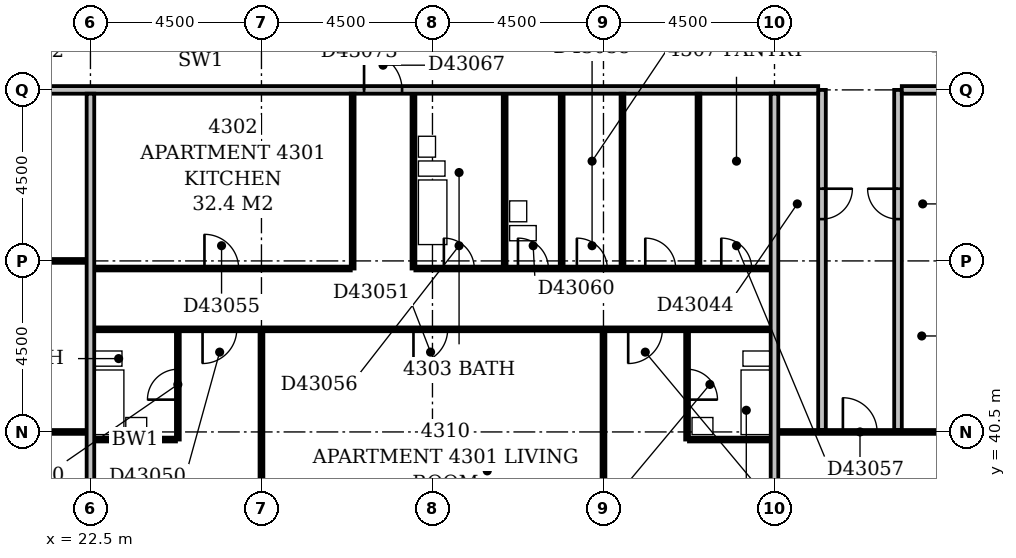
"""IFC4 building model, lengths in metres.
Left out: names, types, materials, properties, quantities, classifications, styles, units other than length and angle.
Written with IfcOpenShell. Run it as: python <this file> out.ifc"""

import sys

from ifc_helpers import new_model, si_unit, direction, frame, frame_2d, origin, place, context, subcontext, project, spatial, rectangle, extrude, element, fill, save


model = new_model("IFC4")
c1 = context("Model", 3, precision=1e-05, world=origin(), true_north=direction((0.0, 1.0)))
c2 = subcontext(c1, "Body", "Model", "MODEL_VIEW")
j1 = project(units=[si_unit("LENGTHUNIT", "METRE"), si_unit("PLANEANGLEUNIT", "RADIAN")], contexts=[c1])
p1 = place(None, origin())
s1 = spatial("IfcSite", under=j1, at=p1, CompositionType="ELEMENT")
p2 = place(p1, origin())
s2 = spatial("IfcBuilding", under=s1, at=p2, CompositionType="ELEMENT")
p3 = place(p2, frame((0.0, 0.0, 170.0)))
s3 = spatial("IfcBuildingStorey", under=s2, at=p3, CompositionType="ELEMENT", Elevation=170.0)
p4 = place(p3, frame((22.5, 36.5, 0.0), z_axis=(0.0, 0.0, 1.0), x_axis=(0.0, 1.0, 0.0)))
e1 = element("IfcWall", 1, at=p4, inside=s3, PredefinedType="PARTITIONING", context=c2, shape_type="SweptSolid", body=[
    extrude(rectangle(XDim=12.9, YDim=0.2, at=frame_2d((6.45, 0.0))), origin(), (0.0, 0.0, 1.0), 3.15),
])
p5 = place(p3, frame((27.0, 36.5, 0.0), z_axis=(0.0, 0.0, 1.0), x_axis=(0.0, 1.0, 0.0)))
e2 = element("IfcWall", 2, at=p5, inside=s3, PredefinedType="PARTITIONING", context=c2, shape_type="SweptSolid", body=[
    extrude(rectangle(XDim=6.65, YDim=0.1, at=frame_2d((3.325, 0.0))), origin(), (0.0, 0.0, 1.0), 2.45),
])
p6 = place(p3, frame((36.0, 36.5, 0.0), z_axis=(0.0, 0.0, 1.0), x_axis=(0.0, 1.0, 0.0)))
e3 = element("IfcWall", 3, at=p6, inside=s3, PredefinedType="PARTITIONING", context=c2, shape_type="SweptSolid", body=[
    extrude(rectangle(XDim=6.65, YDim=0.1, at=frame_2d((3.325, 0.0))), origin(), (0.0, 0.0, 1.0), 2.25),
])
p7 = place(p3, frame((40.5, 36.5, 0.0), z_axis=(0.0, 0.0, 1.0), x_axis=(0.0, 1.0, 0.0)))
e4 = element("IfcWall", 4, at=p7, inside=s3, PredefinedType="PARTITIONING", context=c2, shape_type="SweptSolid", body=[
    extrude(rectangle(XDim=12.9, YDim=0.2, at=frame_2d((6.45, 0.0))), origin(), (0.0, 0.0, 1.0), 3.15),
])
p8 = place(p3, frame((22.6, 40.3, 0.0), z_axis=(0.0, 0.0, 1.0), x_axis=(1.0, 0.0, 0.0)))
e5 = element("IfcWall", 5, at=p8, inside=s3, PredefinedType="PLUMBINGWALL", context=c2, shape_type="SweptSolid", body=[
    extrude(rectangle(XDim=2.15, YDim=0.1, at=frame_2d((1.075, 0.0))), origin(), (0.0, 0.0, 1.0), 3.15),
])
p9 = place(p3, frame((24.8, 40.3, 0.0), z_axis=(0.0, 0.0, 1.0), x_axis=(0.0, 1.0, 0.0)))
e6 = element("IfcWall", 6, at=p9, inside=s3, PredefinedType="PLUMBINGWALL", context=c2, shape_type="SweptSolid", body=[
    extrude(rectangle(XDim=2.85, YDim=0.1, at=frame_2d((1.425, 0.0))), origin(), (0.0, 0.0, 1.0), 3.15),
])
p10 = place(p9, frame((1.05, 0.0, 0.0)))
e7 = element("IfcOpeningElement", 7, at=p10, cuts=e6, PredefinedType="OPENING", context=c2, shape_type="SweptSolid", body=[
    extrude(rectangle(XDim=0.8, YDim=2.1, at=frame_2d((0.4, 1.05))), frame((0.0, 0.062, 0.0), z_axis=(0.0, -1.0, 0.0), x_axis=(1.0, 0.0, 0.0)), (0.0, 0.0, 1.0), 0.124),
])
p11 = place(p3, frame((38.2, 40.3, 0.0), z_axis=(0.0, 0.0, 1.0), x_axis=(0.0, 1.0, 0.0)))
e8 = element("IfcWall", 8, at=p11, inside=s3, PredefinedType="PLUMBINGWALL", context=c2, shape_type="SweptSolid", body=[
    extrude(rectangle(XDim=2.85, YDim=0.1, at=frame_2d((1.425, 0.0))), origin(), (0.0, 0.0, 1.0), 3.15),
])
p12 = place(p11, frame((1.05, 0.0, 0.0)))
e9 = element("IfcOpeningElement", 9, at=p12, cuts=e8, PredefinedType="OPENING", context=c2, shape_type="SweptSolid", body=[
    extrude(rectangle(XDim=0.8, YDim=2.1, at=frame_2d((0.4, 1.05))), frame((0.0, 0.062, 0.0), z_axis=(0.0, -1.0, 0.0), x_axis=(1.0, 0.0, 0.0)), (0.0, 0.0, 1.0), 0.124),
])
p13 = place(p3, frame((38.25, 40.3, 0.0), z_axis=(0.0, 0.0, 1.0), x_axis=(1.0, 0.0, 0.0)))
e10 = element("IfcWall", 10, at=p13, inside=s3, PredefinedType="PLUMBINGWALL", context=c2, shape_type="SweptSolid", body=[
    extrude(rectangle(XDim=2.15, YDim=0.1, at=frame_2d((1.075, 0.0))), origin(), (0.0, 0.0, 1.0), 3.15),
])
p14 = place(p3, frame((9.1, 40.5, 0.0), z_axis=(0.0, 0.0, 1.0), x_axis=(1.0, 0.0, 0.0)))
e11 = element("IfcWall", 11, at=p14, inside=s3, PredefinedType="PARTITIONING", context=c2, shape_type="SweptSolid", body=[
    extrude(rectangle(XDim=13.3, YDim=0.1, at=frame_2d((6.65, 0.0))), origin(), (0.0, 0.0, 1.0), 3.15),
])
p15 = place(p3, frame((40.6, 40.5, 0.0), z_axis=(0.0, 0.0, 1.0), x_axis=(1.0, 0.0, 0.0)))
e12 = element("IfcWall", 12, at=p15, inside=s3, PredefinedType="PARTITIONING", context=c2, shape_type="SweptSolid", body=[
    extrude(rectangle(XDim=4.3, YDim=0.1, at=frame_2d((2.15, 0.0))), origin(), (0.0, 0.0, 1.0), 3.15),
])
p16 = place(p15, frame((1.7, 0.0, 0.0)))
e13 = element("IfcOpeningElement", 13, at=p16, cuts=e12, PredefinedType="OPENING", context=c2, shape_type="SweptSolid", body=[
    extrude(rectangle(XDim=0.9, YDim=2.1, at=frame_2d((0.45, 1.05))), frame((0.0, 0.062, 0.0), z_axis=(0.0, -1.0, 0.0), x_axis=(1.0, 0.0, 0.0)), (0.0, 0.0, 1.0), 0.124),
])
p17 = place(p3, frame((41.75, 40.55, 0.0), z_axis=(0.0, 0.0, 1.0), x_axis=(0.0, 1.0, 0.0)))
e14 = element("IfcWall", 14, at=p17, inside=s3, PredefinedType="PARTITIONING", context=c2, shape_type="SweptSolid", body=[
    extrude(rectangle(XDim=8.95, YDim=0.2, at=frame_2d((4.475, 0.0))), origin(), (0.0, 0.0, 1.0), 3.15),
])
p18 = place(p17, frame((5.55, 0.0, 0.0)))
e15 = element("IfcOpeningElement", 15, at=p18, cuts=e14, PredefinedType="OPENING", context=c2, shape_type="SweptSolid", body=[
    extrude(rectangle(XDim=0.8, YDim=2.1, at=frame_2d((0.4, 1.05))), frame((0.0, 0.112, 0.0), z_axis=(0.0, -1.0, 0.0), x_axis=(1.0, 0.0, 0.0)), (0.0, 0.0, 1.0), 0.224),
])
p19 = place(p3, frame((43.75, 40.55, 0.0), z_axis=(0.0, 0.0, 1.0), x_axis=(0.0, 1.0, 0.0)))
e16 = element("IfcWall", 16, at=p19, inside=s3, PredefinedType="PARTITIONING", context=c2, shape_type="SweptSolid", body=[
    extrude(rectangle(XDim=8.95, YDim=0.2, at=frame_2d((4.475, 0.0))), origin(), (0.0, 0.0, 1.0), 3.15),
])
p20 = place(p19, frame((5.55, 0.0, 0.0)))
e17 = element("IfcOpeningElement", 17, at=p20, cuts=e16, PredefinedType="OPENING", context=c2, shape_type="SweptSolid", body=[
    extrude(rectangle(XDim=0.8, YDim=2.1, at=frame_2d((0.4, 1.05))), frame((0.0, 0.112, 0.0), z_axis=(0.0, -1.0, 0.0), x_axis=(1.0, 0.0, 0.0)), (0.0, 0.0, 1.0), 0.224),
])
p21 = place(p3, frame((22.6, 43.2, 0.0), z_axis=(0.0, 0.0, 1.0), x_axis=(1.0, 0.0, 0.0)))
e18 = element("IfcWall", 18, at=p21, inside=s3, PredefinedType="PARTITIONING", context=c2, shape_type="SweptSolid", body=[
    extrude(rectangle(XDim=17.8, YDim=0.1, at=frame_2d((8.9, 0.0))), origin(), (0.0, 0.0, 1.0), 3.15),
])
p22 = place(p21, frame((2.85, 0.0, 0.0)))
e19 = element("IfcOpeningElement", 19, at=p22, cuts=e18, PredefinedType="OPENING", context=c2, shape_type="SweptSolid", body=[
    extrude(rectangle(XDim=0.9, YDim=2.1, at=frame_2d((0.45, 1.05))), frame((0.0, 0.062, 0.0), z_axis=(0.0, -1.0, 0.0), x_axis=(1.0, 0.0, 0.0)), (0.0, 0.0, 1.0), 0.124),
])
p23 = place(p21, frame((8.4, 0.0, 0.0)))
e20 = element("IfcOpeningElement", 20, at=p23, cuts=e18, PredefinedType="OPENING", context=c2, shape_type="SweptSolid", body=[
    extrude(rectangle(XDim=0.9, YDim=2.1, at=frame_2d((0.45, 1.05))), frame((0.0, 0.062, 0.0), z_axis=(0.0, -1.0, 0.0), x_axis=(1.0, 0.0, 0.0)), (0.0, 0.0, 1.0), 0.124),
])
p24 = place(p21, frame((14.05, 0.0, 0.0)))
e21 = element("IfcOpeningElement", 21, at=p24, cuts=e18, PredefinedType="OPENING", context=c2, shape_type="SweptSolid", body=[
    extrude(rectangle(XDim=0.9, YDim=2.1, at=frame_2d((0.45, 1.05))), frame((0.0, 0.062, 0.0), z_axis=(0.0, -1.0, 0.0), x_axis=(1.0, 0.0, 0.0)), (0.0, 0.0, 1.0), 0.124),
])
p25 = place(p3, frame((22.6, 44.8, 0.0), z_axis=(0.0, 0.0, 1.0), x_axis=(1.0, 0.0, 0.0)))
e22 = element("IfcWall", 22, at=p25, inside=s3, PredefinedType="PARTITIONING", context=c2, shape_type="SweptSolid", body=[
    extrude(rectangle(XDim=6.75, YDim=0.1, at=frame_2d((3.375, 0.0))), origin(), (0.0, 0.0, 1.0), 3.15),
])
p26 = place(p25, frame((2.9, 0.0, 0.0)))
e23 = element("IfcOpeningElement", 23, at=p26, cuts=e22, PredefinedType="OPENING", context=c2, shape_type="SweptSolid", body=[
    extrude(rectangle(XDim=0.9, YDim=2.1, at=frame_2d((0.45, 1.05))), frame((0.0, 0.062, 0.0), z_axis=(0.0, -1.0, 0.0), x_axis=(1.0, 0.0, 0.0)), (0.0, 0.0, 1.0), 0.124),
])
p27 = place(p3, frame((29.4, 44.8, 0.0), z_axis=(0.0, 0.0, 1.0), x_axis=(0.0, 1.0, 0.0)))
e24 = element("IfcWall", 24, at=p27, inside=s3, PredefinedType="PARTITIONING", context=c2, shape_type="SweptSolid", body=[
    extrude(rectangle(XDim=4.6, YDim=0.1, at=frame_2d((2.3, 0.0))), origin(), (0.0, 0.0, 1.0), 3.15),
])
p28 = place(p3, frame((31.0, 44.8, 0.0), z_axis=(0.0, 0.0, 1.0), x_axis=(0.0, 1.0, 0.0)))
e25 = element("IfcWall", 25, at=p28, inside=s3, PredefinedType="PLUMBINGWALL", context=c2, shape_type="SweptSolid", body=[
    extrude(rectangle(XDim=4.6, YDim=0.1, at=frame_2d((2.3, 0.0))), origin(), (0.0, 0.0, 1.0), 3.15),
])
p29 = place(p3, frame((31.05, 44.8, 0.0), z_axis=(0.0, 0.0, 1.0), x_axis=(1.0, 0.0, 0.0)))
e26 = element("IfcWall", 26, at=p29, inside=s3, PredefinedType="PARTITIONING", context=c2, shape_type="SweptSolid", body=[
    extrude(rectangle(XDim=9.35, YDim=0.1, at=frame_2d((4.675, 0.0))), origin(), (0.0, 0.0, 1.0), 3.15),
])
p30 = place(p29, frame((0.75, 0.0, 0.0)))
e27 = element("IfcOpeningElement", 27, at=p30, cuts=e26, PredefinedType="OPENING", context=c2, shape_type="SweptSolid", body=[
    extrude(rectangle(XDim=0.8, YDim=2.1, at=frame_2d((0.4, 1.05))), frame((0.0, 0.062, 0.0), z_axis=(0.0, -1.0, 0.0), x_axis=(1.0, 0.0, 0.0)), (0.0, 0.0, 1.0), 0.124),
])
p31 = place(p29, frame((8.05, 0.0, 0.0)))
e28 = element("IfcOpeningElement", 28, at=p31, cuts=e26, PredefinedType="OPENING", context=c2, shape_type="SweptSolid", body=[
    extrude(rectangle(XDim=0.8, YDim=2.1, at=frame_2d((0.4, 1.05))), frame((0.0, 0.062, 0.0), z_axis=(0.0, -1.0, 0.0), x_axis=(1.0, 0.0, 0.0)), (0.0, 0.0, 1.0), 0.124),
])
p32 = place(p29, frame((4.25, 0.0, 0.0)))
e29 = element("IfcOpeningElement", 29, at=p32, cuts=e26, PredefinedType="OPENING", context=c2, shape_type="SweptSolid", body=[
    extrude(rectangle(XDim=0.8, YDim=2.1, at=frame_2d((0.4, 1.05))), frame((0.0, 0.062, 0.0), z_axis=(0.0, -1.0, 0.0), x_axis=(1.0, 0.0, 0.0)), (0.0, 0.0, 1.0), 0.124),
])
p33 = place(p29, frame((6.05, 0.0, 0.0)))
e30 = element("IfcOpeningElement", 30, at=p33, cuts=e26, PredefinedType="OPENING", context=c2, shape_type="SweptSolid", body=[
    extrude(rectangle(XDim=0.8, YDim=2.1, at=frame_2d((0.4, 1.05))), frame((0.0, 0.062, 0.0), z_axis=(0.0, -1.0, 0.0), x_axis=(1.0, 0.0, 0.0)), (0.0, 0.0, 1.0), 0.124),
])
p34 = place(p29, frame((2.7, 0.0, 0.0)))
e31 = element("IfcOpeningElement", 31, at=p34, cuts=e26, PredefinedType="OPENING", context=c2, shape_type="SweptSolid", body=[
    extrude(rectangle(XDim=0.8, YDim=2.1, at=frame_2d((0.4, 1.05))), frame((0.0, 0.062, 0.0), z_axis=(0.0, -1.0, 0.0), x_axis=(1.0, 0.0, 0.0)), (0.0, 0.0, 1.0), 0.124),
])
for number, where, z_axis, x_axis in (
    (32, (33.4, 44.85, 0.0), (0.0, 0.0, 1.0), (0.0, 1.0, 0.0)),
    (33, (34.9, 44.85, 0.0), (0.0, 0.0, 1.0), (0.0, 1.0, 0.0)),
):
    element("IfcWall", number, at=place(p3, frame(where, z_axis=z_axis, x_axis=x_axis)), inside=s3, PredefinedType="PLUMBINGWALL", context=c2, shape_type="SweptSolid", body=[
        extrude(rectangle(XDim=4.55, YDim=0.1, at=frame_2d((2.275, 0.0))), origin(), (0.0, 0.0, 1.0), 3.15),
    ])
p35 = place(p3, frame((36.5, 44.85, 0.0), z_axis=(0.0, 0.0, 1.0), x_axis=(0.0, 1.0, 0.0)))
e34 = element("IfcWall", 34, at=p35, inside=s3, PredefinedType="PARTITIONING", context=c2, shape_type="SweptSolid", body=[
    extrude(rectangle(XDim=4.55, YDim=0.1, at=frame_2d((2.275, 0.0))), origin(), (0.0, 0.0, 1.0), 2.25),
])
p36 = place(p3, frame((38.5, 44.85, 0.0), z_axis=(0.0, 0.0, 1.0), x_axis=(0.0, 1.0, 0.0)))
e35 = element("IfcWall", 35, at=p36, inside=s3, PredefinedType="PARTITIONING", context=c2, shape_type="SweptSolid", body=[
    extrude(rectangle(XDim=4.55, YDim=0.1, at=frame_2d((2.275, 0.0))), origin(), (0.0, 0.0, 1.0), 3.15),
])
p37 = place(p3, frame((9.1, 45.0, 0.0), z_axis=(0.0, 0.0, 1.0), x_axis=(1.0, 0.0, 0.0)))
e36 = element("IfcWall", 36, at=p37, inside=s3, PredefinedType="PARTITIONING", context=c2, shape_type="SweptSolid", body=[
    extrude(rectangle(XDim=13.3, YDim=0.1, at=frame_2d((6.65, 0.0))), origin(), (0.0, 0.0, 1.0), 3.15),
])
p38 = place(p3, frame((9.1, 49.5, 0.0), z_axis=(0.0, 0.0, 1.0), x_axis=(1.0, 0.0, 0.0)))
e37 = element("IfcWall", 37, at=p38, inside=s3, PredefinedType="PARTITIONING", context=c2, shape_type="SweptSolid", body=[
    extrude(rectangle(XDim=32.55, YDim=0.2, at=frame_2d((16.275, 0.0))), origin(), (0.0, 0.0, 1.0), 3.15),
])
p39 = place(p38, frame((20.6, 0.0, 0.0)))
e38 = element("IfcOpeningElement", 38, at=p39, cuts=e37, PredefinedType="OPENING", context=c2, shape_type="SweptSolid", body=[
    extrude(rectangle(XDim=1.0, YDim=2.1, at=frame_2d((0.5, 1.05))), frame((0.0, 0.112, 0.0), z_axis=(0.0, -1.0, 0.0), x_axis=(1.0, 0.0, 0.0)), (0.0, 0.0, 1.0), 0.224),
])
p40 = place(p38, frame((6.15, 0.0, 0.0)))
e39 = element("IfcOpeningElement", 39, at=p40, cuts=e37, PredefinedType="OPENING", context=c2, shape_type="SweptSolid", body=[
    extrude(rectangle(XDim=0.9, YDim=2.1, at=frame_2d((0.45, 1.05))), frame((0.0, 0.112, 0.0), z_axis=(0.0, -1.0, 0.0), x_axis=(1.0, 0.0, 0.0)), (0.0, 0.0, 1.0), 0.224),
])
p41 = place(p3, frame((43.85, 49.5, 0.0), z_axis=(0.0, 0.0, 1.0), x_axis=(1.0, 0.0, 0.0)))
e40 = element("IfcWall", 40, at=p41, inside=s3, PredefinedType="PARTITIONING", context=c2, shape_type="SweptSolid", body=[
    extrude(rectangle(XDim=11.3, YDim=0.2, at=frame_2d((5.65, 0.0))), origin(), (0.0, 0.0, 1.0), 3.15),
])
p42 = place(p41, frame((1.45, 0.0, 0.0)))
e41 = element("IfcOpeningElement", 41, at=p42, cuts=e40, PredefinedType="OPENING", context=c2, shape_type="SweptSolid", body=[
    extrude(rectangle(XDim=1.0, YDim=2.1, at=frame_2d((0.5, 1.05))), frame((0.0, 0.112, 0.0), z_axis=(0.0, -1.0, 0.0), x_axis=(1.0, 0.0, 0.0)), (0.0, 0.0, 1.0), 0.224),
])
p43 = place(p10, origin())
e42 = element("IfcDoor", 42, at=p43, inside=s3, OperationType="SINGLE_SWING_LEFT", PredefinedType="DOOR", context=c2, shape_type="SweptSolid", body=[
    extrude(rectangle(XDim=0.8, YDim=2.1, at=frame_2d((0.4, 1.05))), frame((0.0, 0.025, 0.0), z_axis=(0.0, -1.0, 0.0), x_axis=(1.0, 0.0, 0.0)), (0.0, 0.0, 1.0), 0.05),
])
fill(e7, e42)
p44 = place(p12, frame((0.8, 0.0, 0.0), z_axis=(0.0, 0.0, 1.0), x_axis=(-1.0, 0.0, 0.0)))
e43 = element("IfcDoor", 43, at=p44, inside=s3, OperationType="SINGLE_SWING_RIGHT", PredefinedType="DOOR", context=c2, shape_type="SweptSolid", body=[
    extrude(rectangle(XDim=0.8, YDim=2.1, at=frame_2d((0.4, 1.05))), frame((0.0, 0.025, 0.0), z_axis=(0.0, -1.0, 0.0), x_axis=(1.0, 0.0, 0.0)), (0.0, 0.0, 1.0), 0.05),
])
fill(e9, e43)
p45 = place(p16, origin())
e44 = element("IfcDoor", 44, at=p45, inside=s3, OperationType="SINGLE_SWING_LEFT", PredefinedType="DOOR", context=c2, shape_type="SweptSolid", body=[
    extrude(rectangle(XDim=0.9, YDim=2.1, at=frame_2d((0.45, 1.05))), frame((0.0, 0.025, 0.0), z_axis=(0.0, -1.0, 0.0), x_axis=(1.0, 0.0, 0.0)), (0.0, 0.0, 1.0), 0.05),
])
fill(e13, e44)
p46 = place(p18, origin())
e45 = element("IfcDoor", 45, at=p46, inside=s3, OperationType="SINGLE_SWING_RIGHT", PredefinedType="DOOR", context=c2, shape_type="SweptSolid", body=[
    extrude(rectangle(XDim=0.8, YDim=2.1, at=frame_2d((0.4, 1.05))), frame((0.0, 0.025, 0.0), z_axis=(0.0, -1.0, 0.0), x_axis=(1.0, 0.0, 0.0)), (0.0, 0.0, 1.0), 0.05),
])
fill(e15, e45)
p47 = place(p20, frame((0.8, 0.0, 0.0), z_axis=(0.0, 0.0, 1.0), x_axis=(-1.0, 0.0, 0.0)))
e46 = element("IfcDoor", 46, at=p47, inside=s3, OperationType="SINGLE_SWING_LEFT", PredefinedType="DOOR", context=c2, shape_type="SweptSolid", body=[
    extrude(rectangle(XDim=0.8, YDim=2.1, at=frame_2d((0.4, 1.05))), frame((0.0, 0.025, 0.0), z_axis=(0.0, -1.0, 0.0), x_axis=(1.0, 0.0, 0.0)), (0.0, 0.0, 1.0), 0.05),
])
fill(e17, e46)
p48 = place(p22, frame((0.9, 0.0, 0.0), z_axis=(0.0, 0.0, 1.0), x_axis=(-1.0, 0.0, 0.0)))
e47 = element("IfcDoor", 47, at=p48, inside=s3, OperationType="SINGLE_SWING_RIGHT", PredefinedType="DOOR", context=c2, shape_type="SweptSolid", body=[
    extrude(rectangle(XDim=0.9, YDim=2.1, at=frame_2d((0.45, 1.05))), frame((0.0, 0.025, 0.0), z_axis=(0.0, -1.0, 0.0), x_axis=(1.0, 0.0, 0.0)), (0.0, 0.0, 1.0), 0.05),
])
fill(e19, e47)
p49 = place(p23, frame((0.9, 0.0, 0.0), z_axis=(0.0, 0.0, 1.0), x_axis=(-1.0, 0.0, 0.0)))
e48 = element("IfcDoor", 48, at=p49, inside=s3, OperationType="SINGLE_SWING_RIGHT", PredefinedType="DOOR", context=c2, shape_type="SweptSolid", body=[
    extrude(rectangle(XDim=0.9, YDim=2.1, at=frame_2d((0.45, 1.05))), frame((0.0, 0.025, 0.0), z_axis=(0.0, -1.0, 0.0), x_axis=(1.0, 0.0, 0.0)), (0.0, 0.0, 1.0), 0.05),
])
fill(e20, e48)
p50 = place(p24, frame((0.9, 0.0, 0.0), z_axis=(0.0, 0.0, 1.0), x_axis=(-1.0, 0.0, 0.0)))
e49 = element("IfcDoor", 49, at=p50, inside=s3, OperationType="SINGLE_SWING_RIGHT", PredefinedType="DOOR", context=c2, shape_type="SweptSolid", body=[
    extrude(rectangle(XDim=0.9, YDim=2.1, at=frame_2d((0.45, 1.05))), frame((0.0, 0.025, 0.0), z_axis=(0.0, -1.0, 0.0), x_axis=(1.0, 0.0, 0.0)), (0.0, 0.0, 1.0), 0.05),
])
fill(e21, e49)
p51 = place(p26, origin())
e50 = element("IfcDoor", 50, at=p51, inside=s3, OperationType="SINGLE_SWING_LEFT", PredefinedType="DOOR", context=c2, shape_type="SweptSolid", body=[
    extrude(rectangle(XDim=0.9, YDim=2.1, at=frame_2d((0.45, 1.05))), frame((0.0, 0.025, 0.0), z_axis=(0.0, -1.0, 0.0), x_axis=(1.0, 0.0, 0.0)), (0.0, 0.0, 1.0), 0.05),
])
fill(e23, e50)
p52 = place(p30, origin())
e51 = element("IfcDoor", 51, at=p52, inside=s3, OperationType="SINGLE_SWING_LEFT", PredefinedType="DOOR", context=c2, shape_type="SweptSolid", body=[
    extrude(rectangle(XDim=0.8, YDim=2.1, at=frame_2d((0.4, 1.05))), frame((0.0, 0.025, 0.0), z_axis=(0.0, -1.0, 0.0), x_axis=(1.0, 0.0, 0.0)), (0.0, 0.0, 1.0), 0.05),
])
fill(e27, e51)
p53 = place(p31, origin())
e52 = element("IfcDoor", 52, at=p53, inside=s3, OperationType="SINGLE_SWING_LEFT", PredefinedType="DOOR", context=c2, shape_type="SweptSolid", body=[
    extrude(rectangle(XDim=0.8, YDim=2.1, at=frame_2d((0.4, 1.05))), frame((0.0, 0.025, 0.0), z_axis=(0.0, -1.0, 0.0), x_axis=(1.0, 0.0, 0.0)), (0.0, 0.0, 1.0), 0.05),
])
fill(e28, e52)
p54 = place(p32, origin())
e53 = element("IfcDoor", 53, at=p54, inside=s3, OperationType="SINGLE_SWING_LEFT", PredefinedType="DOOR", context=c2, shape_type="SweptSolid", body=[
    extrude(rectangle(XDim=0.8, YDim=2.1, at=frame_2d((0.4, 1.05))), frame((0.0, 0.025, 0.0), z_axis=(0.0, -1.0, 0.0), x_axis=(1.0, 0.0, 0.0)), (0.0, 0.0, 1.0), 0.05),
])
fill(e29, e53)
p55 = place(p33, origin())
e54 = element("IfcDoor", 54, at=p55, inside=s3, OperationType="SINGLE_SWING_LEFT", PredefinedType="DOOR", context=c2, shape_type="SweptSolid", body=[
    extrude(rectangle(XDim=0.8, YDim=2.1, at=frame_2d((0.4, 1.05))), frame((0.0, 0.025, 0.0), z_axis=(0.0, -1.0, 0.0), x_axis=(1.0, 0.0, 0.0)), (0.0, 0.0, 1.0), 0.05),
])
fill(e30, e54)
p56 = place(p34, origin())
e55 = element("IfcDoor", 55, at=p56, inside=s3, OperationType="SINGLE_SWING_LEFT", PredefinedType="DOOR", context=c2, shape_type="SweptSolid", body=[
    extrude(rectangle(XDim=0.8, YDim=2.1, at=frame_2d((0.4, 1.05))), frame((0.0, 0.025, 0.0), z_axis=(0.0, -1.0, 0.0), x_axis=(1.0, 0.0, 0.0)), (0.0, 0.0, 1.0), 0.05),
])
fill(e31, e55)
p57 = place(p39, origin())
e56 = element("IfcDoor", 56, at=p57, inside=s3, OperationType="SINGLE_SWING_LEFT", PredefinedType="DOOR", context=c2, shape_type="SweptSolid", body=[
    extrude(rectangle(XDim=1.0, YDim=2.1, at=frame_2d((0.5, 1.05))), frame((0.0, 0.025, 0.0), z_axis=(0.0, -1.0, 0.0), x_axis=(1.0, 0.0, 0.0)), (0.0, 0.0, 1.0), 0.05),
])
fill(e38, e56)
save(model, sys.argv[1])
